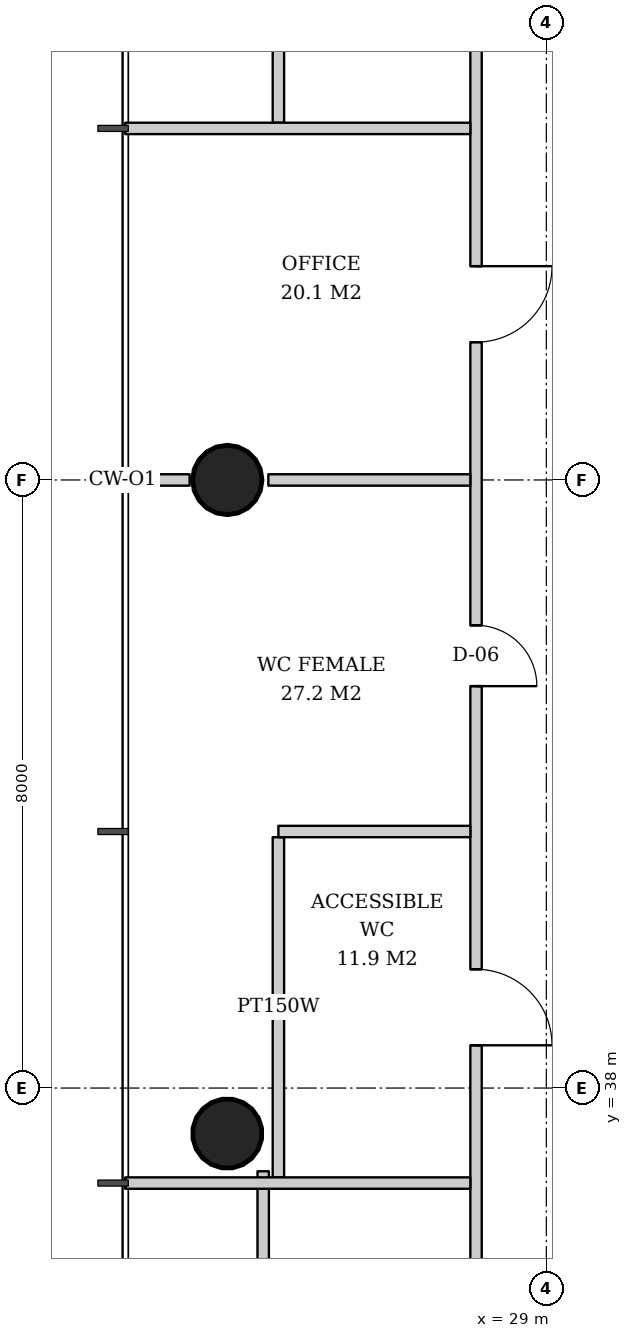
"""IFC4 building model, lengths in metres.
Left out: names, types, materials, properties, quantities, classifications, styles, units other than length and angle.
Written with IfcOpenShell. Run it as: python <this file> out.ifc"""

import sys

from ifc_helpers import new_model, si_unit, direction, frame, frame_2d, origin, origin_2d, place, context, subcontext, project, spatial, rectangle, hollow_circle, extrude, element, fill, save


model = new_model("IFC4")
c1 = context("Model", 3, precision=1e-05, world=origin(), true_north=direction((0.0, 1.0)))
c2 = subcontext(c1, "Body", "Model", "MODEL_VIEW")
j1 = project(units=[si_unit("LENGTHUNIT", "METRE"), si_unit("PLANEANGLEUNIT", "RADIAN")], contexts=[c1])
p1 = place(None, origin())
s1 = spatial("IfcSite", under=j1, at=p1, CompositionType="ELEMENT")
p2 = place(p1, origin())
s2 = spatial("IfcBuilding", under=s1, at=p2, CompositionType="ELEMENT")
p3 = place(p2, frame((0.0, 0.0, 138.8)))
s3 = spatial("IfcBuildingStorey", under=s2, at=p3, CompositionType="ELEMENT", Elevation=138.8)
p4 = place(p3, frame((24.764, 46.0, 0.0), z_axis=(0.031914348339, 0.0, 0.999490607445), x_axis=(0.0, 1.0, 0.0)))
e1 = element("IfcColumn", 1, at=p4, inside=s3, PredefinedType="COLUMN", context=c2, shape_type="SweptSolid", body=[
    extrude(hollow_circle(Radius=0.457, WallThickness=0.03, at=origin_2d()), origin(), (0.0, 0.0, 1.0), 3.802),
])
p5 = place(p3, frame((24.764, 37.382, 0.0), z_axis=(0.031910269556, 0.015987237665, 0.999362868496), x_axis=(-0.447933021895, 0.894067115991, 0.0)))
e2 = element("IfcColumn", 2, at=p5, inside=s3, PredefinedType="COLUMN", context=c2, shape_type="SweptSolid", body=[
    extrude(hollow_circle(Radius=0.457, WallThickness=0.03, at=origin_2d()), origin(), (0.0, 0.0, 1.0), 3.802),
])
p6 = place(p3, frame((25.475, 53.99, 0.0), z_axis=(0.0, 0.0, 1.0), x_axis=(0.0, -1.0, 0.0)))
e3 = element("IfcWall", 3, at=p6, inside=s3, PredefinedType="PARTITIONING", context=c2, shape_type="SweptSolid", body=[
    extrude(rectangle(XDim=3.29, YDim=0.15, at=frame_2d((1.645, 0.0))), origin(), (0.0, 0.0, 1.0), 2.858),
])
p7 = place(p3, frame((25.475, 41.3, 0.0), z_axis=(0.0, 0.0, 1.0), x_axis=(0.0, -1.0, 0.0)))
e4 = element("IfcWall", 4, at=p7, inside=s3, PredefinedType="PARTITIONING", context=c2, shape_type="SweptSolid", body=[
    extrude(rectangle(XDim=4.475, YDim=0.15, at=frame_2d((2.238, 0.0))), origin(), (0.0, 0.0, 1.0), 2.806),
])
p8 = place(p3, frame((25.275, 36.905, 0.0), z_axis=(0.0, 0.0, 1.0), x_axis=(0.0, -1.0, 0.0)))
e5 = element("IfcWall", 5, at=p8, inside=s3, PredefinedType="PARTITIONING", context=c2, shape_type="SweptSolid", body=[
    extrude(rectangle(XDim=4.705, YDim=0.15, at=frame_2d((2.353, 0.0))), origin(), (0.0, 0.0, 1.0), 2.806),
])
p9 = place(p3, frame((28.075, 61.011, 0.0), z_axis=(0.0, 0.0, 1.0), x_axis=(0.0, -1.0, 0.0)))
e6 = element("IfcWall", 6, at=p9, inside=s3, PredefinedType="PARTITIONING", context=c2, shape_type="SweptSolid", body=[
    extrude(rectangle(XDim=30.023, YDim=0.15, at=frame_2d((15.011, 0.0))), origin(), (0.0, 0.0, 1.0), 2.72),
])
p10 = place(p9, frame((2.949, 0.0, 0.0)))
e7 = element("IfcOpeningElement", 7, at=p10, cuts=e6, PredefinedType="OPENING", context=c2, shape_type="SweptSolid", body=[
    extrude(rectangle(XDim=1.0, YDim=2.1, at=frame_2d((0.5, 1.05))), frame((0.0, 0.085, 0.0), z_axis=(0.0, -1.0, 0.0), x_axis=(1.0, 0.0, 0.0)), (0.0, 0.0, 1.0), 0.17),
])
p11 = place(p9, frame((7.574, 0.0, 0.0)))
e8 = element("IfcOpeningElement", 8, at=p11, cuts=e6, PredefinedType="OPENING", context=c2, shape_type="SweptSolid", body=[
    extrude(rectangle(XDim=1.0, YDim=2.1, at=frame_2d((0.5, 1.05))), frame((0.0, 0.085, 0.0), z_axis=(0.0, -1.0, 0.0), x_axis=(1.0, 0.0, 0.0)), (0.0, 0.0, 1.0), 0.17),
])
p12 = place(p9, frame((12.199, 0.0, 0.0)))
e9 = element("IfcOpeningElement", 9, at=p12, cuts=e6, PredefinedType="OPENING", context=c2, shape_type="SweptSolid", body=[
    extrude(rectangle(XDim=1.0, YDim=2.1, at=frame_2d((0.5, 1.05))), frame((0.0, 0.085, 0.0), z_axis=(0.0, -1.0, 0.0), x_axis=(1.0, 0.0, 0.0)), (0.0, 0.0, 1.0), 0.17),
])
p13 = place(p9, frame((16.924, 0.0, 0.0)))
e10 = element("IfcOpeningElement", 10, at=p13, cuts=e6, PredefinedType="OPENING", context=c2, shape_type="SweptSolid", body=[
    extrude(rectangle(XDim=0.8, YDim=2.1, at=frame_2d((0.4, 1.05))), frame((0.0, 0.085, 0.0), z_axis=(0.0, -1.0, 0.0), x_axis=(1.0, 0.0, 0.0)), (0.0, 0.0, 1.0), 0.17),
])
p14 = place(p9, frame((21.449, 0.0, 0.0)))
e11 = element("IfcOpeningElement", 11, at=p14, cuts=e6, PredefinedType="OPENING", context=c2, shape_type="SweptSolid", body=[
    extrude(rectangle(XDim=1.0, YDim=2.1, at=frame_2d((0.5, 1.05))), frame((0.0, 0.085, 0.0), z_axis=(0.0, -1.0, 0.0), x_axis=(1.0, 0.0, 0.0)), (0.0, 0.0, 1.0), 0.17),
])
p15 = place(p9, frame((26.174, 0.0, 0.0)))
e12 = element("IfcOpeningElement", 12, at=p15, cuts=e6, PredefinedType="OPENING", context=c2, shape_type="SweptSolid", body=[
    extrude(rectangle(XDim=0.8, YDim=2.1, at=frame_2d((0.4, 1.05))), frame((0.0, 0.085, 0.0), z_axis=(0.0, -1.0, 0.0), x_axis=(1.0, 0.0, 0.0)), (0.0, 0.0, 1.0), 0.17),
])
p16 = place(p3, frame((28.0, 50.625, 0.0), z_axis=(0.0, 0.0, 1.0), x_axis=(-1.0, 0.0, 0.0)))
e13 = element("IfcWall", 13, at=p16, inside=s3, PredefinedType="PARTITIONING", context=c2, shape_type="SweptSolid", body=[
    extrude(rectangle(XDim=4.54, YDim=0.15, at=frame_2d((2.27, 0.0))), origin(), (0.0, 0.0, 1.0), 2.82),
])
p17 = place(p3, frame((28.0, 46.0, 0.0), z_axis=(0.0, 0.0, 1.0), x_axis=(-1.0, 0.0, 0.0)))
e14 = element("IfcWall", 14, at=p17, inside=s3, PredefinedType="PARTITIONING", context=c2, shape_type="SweptSolid", body=[
    extrude(rectangle(XDim=2.657, YDim=0.15, at=frame_2d((1.329, 0.0))), origin(), (0.0, 0.0, 1.0), 3.62),
])
p18 = place(p3, frame((24.307, 46.0, 0.0), z_axis=(0.0, 0.0, 1.0), x_axis=(-1.0, 0.0, 0.0)))
e15 = element("IfcWall", 15, at=p18, inside=s3, PredefinedType="PARTITIONING", context=c2, shape_type="SweptSolid", body=[
    extrude(rectangle(XDim=0.847, YDim=0.15, at=frame_2d((0.424, 0.0))), origin(), (0.0, 0.0, 1.0), 3.62),
])
p19 = place(p3, frame((28.0, 41.375, 0.0), z_axis=(0.0, 0.0, 1.0), x_axis=(-1.0, 0.0, 0.0)))
e16 = element("IfcWall", 16, at=p19, inside=s3, PredefinedType="PARTITIONING", context=c2, shape_type="SweptSolid", body=[
    extrude(rectangle(XDim=2.525, YDim=0.15, at=frame_2d((1.262, 0.0))), origin(), (0.0, 0.0, 1.0), 3.62),
])
p20 = place(p3, frame((28.0, 36.75, 0.0), z_axis=(0.0, 0.0, 1.0), x_axis=(-1.0, 0.0, 0.0)))
e17 = element("IfcWall", 17, at=p20, inside=s3, PredefinedType="PARTITIONING", context=c2, shape_type="SweptSolid", body=[
    extrude(rectangle(XDim=4.54, YDim=0.15, at=frame_2d((2.27, 0.0))), origin(), (0.0, 0.0, 1.0), 2.82),
])
p21 = place(p12, origin())
e18 = element("IfcDoor", 18, at=p21, inside=s3, OperationType="SINGLE_SWING_LEFT", PredefinedType="DOOR", context=c2, shape_type="SweptSolid", body=[
    extrude(rectangle(XDim=1.0, YDim=2.1, at=frame_2d((0.5, 1.05))), frame((0.0, 0.025, 0.0), z_axis=(0.0, -1.0, 0.0), x_axis=(1.0, 0.0, 0.0)), (0.0, 0.0, 1.0), 0.05),
])
fill(e9, e18)
p22 = place(p13, origin())
e19 = element("IfcDoor", 19, at=p22, inside=s3, OperationType="SINGLE_SWING_RIGHT", PredefinedType="DOOR", context=c2, shape_type="SweptSolid", body=[
    extrude(rectangle(XDim=0.8, YDim=2.1, at=frame_2d((0.4, 1.05))), frame((0.0, 0.025, 0.0), z_axis=(0.0, -1.0, 0.0), x_axis=(1.0, 0.0, 0.0)), (0.0, 0.0, 1.0), 0.05),
])
fill(e10, e19)
p23 = place(p14, origin())
e20 = element("IfcDoor", 20, at=p23, inside=s3, OperationType="SINGLE_SWING_RIGHT", PredefinedType="DOOR", context=c2, shape_type="SweptSolid", body=[
    extrude(rectangle(XDim=1.0, YDim=2.1, at=frame_2d((0.5, 1.05))), frame((0.0, 0.025, 0.0), z_axis=(0.0, -1.0, 0.0), x_axis=(1.0, 0.0, 0.0)), (0.0, 0.0, 1.0), 0.05),
])
fill(e11, e20)
save(model, sys.argv[1])
